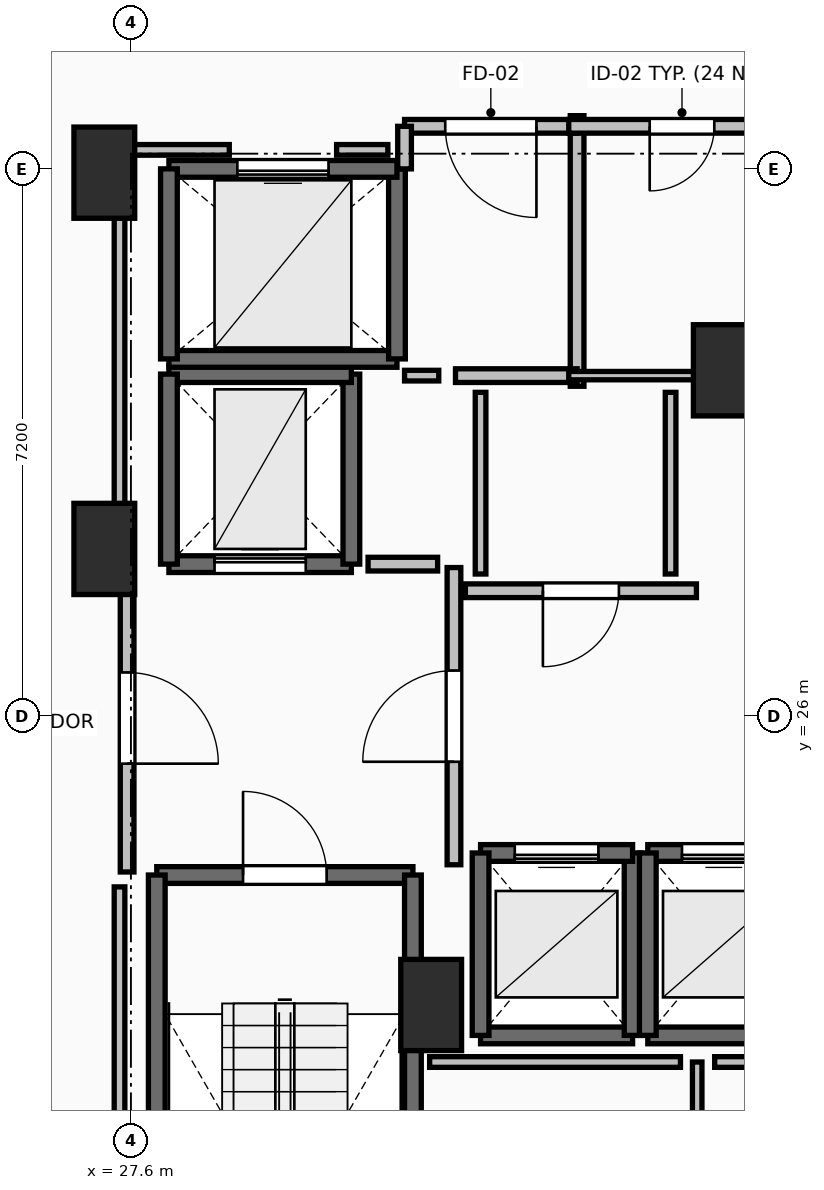
"""IFC4 building model, lengths in metres.
Left out: names, types, materials, properties, quantities, classifications, styles, units other than length and angle.
Written with IfcOpenShell. Run it as: python <this file> out.ifc"""

import sys

from ifc_helpers import new_model, si_unit, direction, frame, frame_2d, origin, origin_2d, place, context, subcontext, project, spatial, rectangle, extrude, element, fill, save


model = new_model("IFC4")
c1 = context("Model", 3, precision=1e-05, world=origin(), true_north=direction((0.0, 1.0)))
c2 = subcontext(c1, "Body", "Model", "MODEL_VIEW")
j1 = project(units=[si_unit("LENGTHUNIT", "METRE"), si_unit("PLANEANGLEUNIT", "RADIAN")], contexts=[c1])
p1 = place(None, origin())
s1 = spatial("IfcSite", under=j1, at=p1, CompositionType="ELEMENT")
p2 = place(p1, origin())
s2 = spatial("IfcBuilding", under=s1, at=p2, CompositionType="ELEMENT")
p3 = place(p2, frame((0.0, 0.0, 146.6)))
s3 = spatial("IfcBuildingStorey", under=s2, at=p3, CompositionType="ELEMENT", Elevation=146.6)
for number, where, z_axis, x_axis in (
    (1, (27.25, 28.2, 0.0), (0.0, 0.0, 1.0), (1.0, 0.0, 0.0)),
    (2, (27.25, 33.15, 0.0), (0.0, 0.0, 1.0), (1.0, 0.0, 0.0)),
    (3, (31.55, 22.2, 0.0), (0.0, 0.0, 1.0), (1.0, 0.0, 0.0)),
    (4, (35.4, 30.55, 0.0), (0.0, 0.0, 1.0), (1.0, 0.0, 0.0)),
):
    element("IfcColumn", number, at=place(p3, frame(where, z_axis=z_axis, x_axis=x_axis)), inside=s3, PredefinedType="PILASTER", context=c2, shape_type="SweptSolid", body=[
        extrude(rectangle(XDim=0.8, YDim=1.2, at=origin_2d()), origin(), (0.0, 0.0, 1.0), 3.5),
    ])
p4 = place(p3, frame((27.94, 23.91, 0.0), z_axis=(0.0, 0.0, 1.0), x_axis=(1.0, 0.0, 0.0)))
e5 = element("IfcWall", 5, at=p4, inside=s3, PredefinedType="SOLIDWALL", context=c2, shape_type="SweptSolid", body=[
    extrude(rectangle(XDim=3.37, YDim=0.22, at=frame_2d((1.685, 0.0))), origin(), (0.0, 0.0, 1.0), 3.24),
])
p5 = place(p4, frame((1.135, 0.0, 0.0)))
e6 = element("IfcOpeningElement", 6, at=p5, cuts=e5, PredefinedType="OPENING", context=c2, shape_type="SweptSolid", body=[
    extrude(rectangle(XDim=1.1, YDim=2.15, at=frame_2d((0.55, 1.075))), frame((0.0, 0.125, 0.0), z_axis=(0.0, -1.0, 0.0), x_axis=(1.0, 0.0, 0.0)), (0.0, 0.0, 1.0), 0.25),
])
for number, where, z_axis, x_axis in (
    (7, (31.31, 23.91, 0.0), (0.0, 0.0, 1.0), (0.0, -1.0, 0.0)),
    (8, (27.94, 16.49, 0.0), (0.0, 0.0, 1.0), (0.0, 1.0, 0.0)),
):
    element("IfcWall", number, at=place(p3, frame(where, z_axis=z_axis, x_axis=x_axis)), inside=s3, PredefinedType="SOLIDWALL", context=c2, shape_type="SweptSolid", body=[
        extrude(rectangle(XDim=7.42, YDim=0.22, at=frame_2d((3.71, 0.0))), origin(), (0.0, 0.0, 1.0), 3.24),
    ])
p6 = place(p3, frame((32.2, 21.8, 0.0), z_axis=(0.0, 0.0, 1.0), x_axis=(1.0, 0.0, 0.0)))
e9 = element("IfcWall", 9, at=p6, inside=s3, PredefinedType="SOLIDWALL", context=c2, shape_type="SweptSolid", body=[
    extrude(rectangle(XDim=2.0, YDim=0.22, at=frame_2d((1.0, 0.0))), origin(), (0.0, 0.0, 1.0), 3.24),
])
p7 = place(p3, frame((34.2, 21.8, 0.0), z_axis=(0.0, 0.0, 1.0), x_axis=(0.0, 1.0, 0.0)))
e10 = element("IfcWall", 10, at=p7, inside=s3, PredefinedType="SOLIDWALL", context=c2, shape_type="SweptSolid", body=[
    extrude(rectangle(XDim=2.4, YDim=0.22, at=frame_2d((1.2, 0.0))), origin(), (0.0, 0.0, 1.0), 3.24),
])
p8 = place(p3, frame((34.2, 24.2, 0.0), z_axis=(0.0, 0.0, 1.0), x_axis=(-1.0, 0.0, 0.0)))
e11 = element("IfcWall", 11, at=p8, inside=s3, PredefinedType="SOLIDWALL", context=c2, shape_type="SweptSolid", body=[
    extrude(rectangle(XDim=2.0, YDim=0.22, at=frame_2d((1.0, 0.0))), origin(), (0.0, 0.0, 1.0), 3.24),
])
p9 = place(p8, frame((0.45, 0.0, 0.0)))
e12 = element("IfcOpeningElement", 12, at=p9, cuts=e11, PredefinedType="OPENING", context=c2, shape_type="SweptSolid", body=[
    extrude(rectangle(XDim=1.1, YDim=2.2, at=frame_2d((0.55, 1.1))), frame((0.0, 0.125, 0.0), z_axis=(0.0, -1.0, 0.0), x_axis=(1.0, 0.0, 0.0)), (0.0, 0.0, 1.0), 0.25),
])
p10 = place(p3, frame((32.2, 24.2, 0.0), z_axis=(0.0, 0.0, 1.0), x_axis=(0.0, -1.0, 0.0)))
e13 = element("IfcWall", 13, at=p10, inside=s3, PredefinedType="SOLIDWALL", context=c2, shape_type="SweptSolid", body=[
    extrude(rectangle(XDim=2.4, YDim=0.22, at=frame_2d((1.2, 0.0))), origin(), (0.0, 0.0, 1.0), 3.24),
])
p11 = place(p3, frame((34.4, 21.8, 0.0), z_axis=(0.0, 0.0, 1.0), x_axis=(1.0, 0.0, 0.0)))
e14 = element("IfcWall", 14, at=p11, inside=s3, PredefinedType="SOLIDWALL", context=c2, shape_type="SweptSolid", body=[
    extrude(rectangle(XDim=2.0, YDim=0.22, at=frame_2d((1.0, 0.0))), origin(), (0.0, 0.0, 1.0), 3.24),
])
p12 = place(p3, frame((36.4, 24.2, 0.0), z_axis=(0.0, 0.0, 1.0), x_axis=(-1.0, 0.0, 0.0)))
e15 = element("IfcWall", 15, at=p12, inside=s3, PredefinedType="SOLIDWALL", context=c2, shape_type="SweptSolid", body=[
    extrude(rectangle(XDim=2.0, YDim=0.22, at=frame_2d((1.0, 0.0))), origin(), (0.0, 0.0, 1.0), 3.24),
])
p13 = place(p12, frame((0.45, 0.0, 0.0)))
e16 = element("IfcOpeningElement", 16, at=p13, cuts=e15, PredefinedType="OPENING", context=c2, shape_type="SweptSolid", body=[
    extrude(rectangle(XDim=1.1, YDim=2.2, at=frame_2d((0.55, 1.1))), frame((0.0, 0.125, 0.0), z_axis=(0.0, -1.0, 0.0), x_axis=(1.0, 0.0, 0.0)), (0.0, 0.0, 1.0), 0.25),
])
p14 = place(p3, frame((34.4, 24.2, 0.0), z_axis=(0.0, 0.0, 1.0), x_axis=(0.0, -1.0, 0.0)))
e17 = element("IfcWall", 17, at=p14, inside=s3, PredefinedType="SOLIDWALL", context=c2, shape_type="SweptSolid", body=[
    extrude(rectangle(XDim=2.4, YDim=0.22, at=frame_2d((1.2, 0.0))), origin(), (0.0, 0.0, 1.0), 3.24),
])
p15 = place(p3, frame((28.1, 28.0, 0.0), z_axis=(0.0, 0.0, 1.0), x_axis=(1.0, 0.0, 0.0)))
e18 = element("IfcWall", 18, at=p15, inside=s3, PredefinedType="SHEAR", context=c2, shape_type="SweptSolid", body=[
    extrude(rectangle(XDim=2.4, YDim=0.22, at=frame_2d((1.2, 0.0))), origin(), (0.0, 0.0, 1.0), 3.24),
])
p16 = place(p15, frame((0.6, 0.0, 0.0)))
e19 = element("IfcOpeningElement", 19, at=p16, cuts=e18, PredefinedType="OPENING", context=c2, shape_type="SweptSolid", body=[
    extrude(rectangle(XDim=1.2, YDim=2.2, at=frame_2d((0.6, 1.1))), frame((0.0, 0.125, 0.0), z_axis=(0.0, -1.0, 0.0), x_axis=(1.0, 0.0, 0.0)), (0.0, 0.0, 1.0), 0.25),
])
p17 = place(p3, frame((30.5, 28.0, 0.0), z_axis=(0.0, 0.0, 1.0), x_axis=(0.0, 1.0, 0.0)))
e20 = element("IfcWall", 20, at=p17, inside=s3, PredefinedType="SHEAR", context=c2, shape_type="SweptSolid", body=[
    extrude(rectangle(XDim=2.5, YDim=0.22, at=frame_2d((1.25, 0.0))), origin(), (0.0, 0.0, 1.0), 3.24),
])
p18 = place(p3, frame((30.5, 30.5, 0.0), z_axis=(0.0, 0.0, 1.0), x_axis=(-1.0, 0.0, 0.0)))
e21 = element("IfcWall", 21, at=p18, inside=s3, PredefinedType="SHEAR", context=c2, shape_type="SweptSolid", body=[
    extrude(rectangle(XDim=2.4, YDim=0.22, at=frame_2d((1.2, 0.0))), origin(), (0.0, 0.0, 1.0), 3.24),
])
p19 = place(p3, frame((28.1, 30.5, 0.0), z_axis=(0.0, 0.0, 1.0), x_axis=(0.0, -1.0, 0.0)))
e22 = element("IfcWall", 22, at=p19, inside=s3, PredefinedType="SHEAR", context=c2, shape_type="SweptSolid", body=[
    extrude(rectangle(XDim=2.5, YDim=0.22, at=frame_2d((1.25, 0.0))), origin(), (0.0, 0.0, 1.0), 3.24),
])
p20 = place(p3, frame((28.1, 30.7, 0.0), z_axis=(0.0, 0.0, 1.0), x_axis=(1.0, 0.0, 0.0)))
e23 = element("IfcWall", 23, at=p20, inside=s3, PredefinedType="SOLIDWALL", context=c2, shape_type="SweptSolid", body=[
    extrude(rectangle(XDim=3.0, YDim=0.22, at=frame_2d((1.5, 0.0))), origin(), (0.0, 0.0, 1.0), 3.24),
])
p21 = place(p3, frame((31.1, 30.7, 0.0), z_axis=(0.0, 0.0, 1.0), x_axis=(0.0, 1.0, 0.0)))
e24 = element("IfcWall", 24, at=p21, inside=s3, PredefinedType="SOLIDWALL", context=c2, shape_type="SweptSolid", body=[
    extrude(rectangle(XDim=2.5, YDim=0.22, at=frame_2d((1.25, 0.0))), origin(), (0.0, 0.0, 1.0), 3.24),
])
p22 = place(p3, frame((31.1, 33.2, 0.0), z_axis=(0.0, 0.0, 1.0), x_axis=(-1.0, 0.0, 0.0)))
e25 = element("IfcWall", 25, at=p22, inside=s3, PredefinedType="SOLIDWALL", context=c2, shape_type="SweptSolid", body=[
    extrude(rectangle(XDim=3.0, YDim=0.22, at=frame_2d((1.5, 0.0))), origin(), (0.0, 0.0, 1.0), 3.24),
])
p23 = place(p22, frame((0.9, 0.0, 0.0)))
e26 = element("IfcOpeningElement", 26, at=p23, cuts=e25, PredefinedType="OPENING", context=c2, shape_type="SweptSolid", body=[
    extrude(rectangle(XDim=1.2, YDim=2.2, at=frame_2d((0.6, 1.1))), frame((0.0, 0.125, 0.0), z_axis=(0.0, -1.0, 0.0), x_axis=(1.0, 0.0, 0.0)), (0.0, 0.0, 1.0), 0.25),
])
p24 = place(p3, frame((28.1, 33.2, 0.0), z_axis=(0.0, 0.0, 1.0), x_axis=(0.0, -1.0, 0.0)))
e27 = element("IfcWall", 27, at=p24, inside=s3, PredefinedType="SOLIDWALL", context=c2, shape_type="SweptSolid", body=[
    extrude(rectangle(XDim=2.5, YDim=0.22, at=frame_2d((1.25, 0.0))), origin(), (0.0, 0.0, 1.0), 3.24),
])
p25 = place(p3, frame((31.85, 24.045, 0.0), z_axis=(0.0, 0.0, 1.0), x_axis=(0.0, 1.0, 0.0)))
e28 = element("IfcWall", 28, at=p25, inside=s3, PredefinedType="PARTITIONING", context=c2, shape_type="SweptSolid", body=[
    extrude(rectangle(XDim=3.91, YDim=0.18, at=frame_2d((1.955, 0.0))), origin(), (0.0, 0.0, 1.0), 3.24),
])
p26 = place(p25, frame((1.355, 0.0, 0.0)))
e29 = element("IfcOpeningElement", 29, at=p26, cuts=e28, PredefinedType="OPENING", context=c2, shape_type="SweptSolid", body=[
    extrude(rectangle(XDim=1.2, YDim=2.15, at=frame_2d((0.6, 1.075))), frame((0.0, 0.105, 0.0), z_axis=(0.0, -1.0, 0.0), x_axis=(1.0, 0.0, 0.0)), (0.0, 0.0, 1.0), 0.21),
])
p27 = place(p3, frame((27.55, 28.0, 0.0), z_axis=(0.0, 0.0, 1.0), x_axis=(0.0, -1.0, 0.0)))
e30 = element("IfcWall", 30, at=p27, inside=s3, PredefinedType="PARTITIONING", context=c2, shape_type="SweptSolid", body=[
    extrude(rectangle(XDim=4.05, YDim=0.18, at=frame_2d((2.025, 0.0))), origin(), (0.0, 0.0, 1.0), 3.24),
])
p28 = place(p27, frame((1.425, 0.0, 0.0)))
e31 = element("IfcOpeningElement", 31, at=p28, cuts=e30, PredefinedType="OPENING", context=c2, shape_type="SweptSolid", body=[
    extrude(rectangle(XDim=1.2, YDim=2.15, at=frame_2d((0.6, 1.075))), frame((0.0, 0.105, 0.0), z_axis=(0.0, -1.0, 0.0), x_axis=(1.0, 0.0, 0.0)), (0.0, 0.0, 1.0), 0.21),
])
p29 = place(p3, frame((33.47, 30.34, 0.0), z_axis=(0.0, 0.0, 1.0), x_axis=(0.0, 1.0, 0.0)))
e32 = element("IfcWall", 32, at=p29, inside=s3, PredefinedType="PARTITIONING", context=c2, shape_type="SweptSolid", body=[
    extrude(rectangle(XDim=3.56, YDim=0.18, at=frame_2d((1.78, 0.0))), origin(), (0.0, 0.0, 1.0), 3.24),
])
p30 = place(p3, frame((31.87, 30.48, 0.0), z_axis=(0.0, 0.0, 1.0), x_axis=(1.0, 0.0, 0.0)))
e33 = element("IfcWall", 33, at=p30, inside=s3, PredefinedType="PARTITIONING", context=c2, shape_type="SweptSolid", body=[
    extrude(rectangle(XDim=1.6, YDim=0.18, at=frame_2d((0.8, 0.0))), origin(), (0.0, 0.0, 1.0), 3.24),
])
p31 = place(p3, frame((33.47, 33.76, 0.0), z_axis=(0.0, 0.0, 1.0), x_axis=(-1.0, 0.0, 0.0)))
e34 = element("IfcWall", 34, at=p31, inside=s3, PredefinedType="PARTITIONING", context=c2, shape_type="SweptSolid", body=[
    extrude(rectangle(XDim=2.27, YDim=0.18, at=frame_2d((1.135, 0.0))), origin(), (0.0, 0.0, 1.0), 3.24),
])
p32 = place(p31, frame((0.535, 0.0, 0.0)))
e35 = element("IfcOpeningElement", 35, at=p32, cuts=e34, PredefinedType="OPENING", context=c2, shape_type="SweptSolid", body=[
    extrude(rectangle(XDim=1.2, YDim=2.15, at=frame_2d((0.6, 1.075))), frame((0.0, 0.105, 0.0), z_axis=(0.0, -1.0, 0.0), x_axis=(1.0, 0.0, 0.0)), (0.0, 0.0, 1.0), 0.21),
])
p33 = place(p3, frame((31.2, 33.76, 0.0), z_axis=(0.0, 0.0, 1.0), x_axis=(0.0, -1.0, 0.0)))
e36 = element("IfcWall", 36, at=p33, inside=s3, PredefinedType="PARTITIONING", context=c2, shape_type="SweptSolid", body=[
    extrude(rectangle(XDim=0.56, YDim=0.18, at=frame_2d((0.28, 0.0))), origin(), (0.0, 0.0, 1.0), 3.24),
])
p34 = place(p3, frame((35.04, 27.65, 0.0), z_axis=(0.0, 0.0, 1.0), x_axis=(-1.0, 0.0, 0.0)))
e37 = element("IfcWall", 37, at=p34, inside=s3, PredefinedType="PARTITIONING", context=c2, shape_type="SweptSolid", body=[
    extrude(rectangle(XDim=3.04, YDim=0.18, at=frame_2d((1.52, 0.0))), origin(), (0.0, 0.0, 1.0), 3.24),
])
p35 = place(p34, frame((1.02, 0.0, 0.0)))
e38 = element("IfcOpeningElement", 38, at=p35, cuts=e37, PredefinedType="OPENING", context=c2, shape_type="SweptSolid", body=[
    extrude(rectangle(XDim=1.0, YDim=2.15, at=frame_2d((0.5, 1.075))), frame((0.0, 0.105, 0.0), z_axis=(0.0, -1.0, 0.0), x_axis=(1.0, 0.0, 0.0)), (0.0, 0.0, 1.0), 0.21),
])
p36 = place(p3, frame((33.36, 30.48, 0.0), z_axis=(0.0, 0.0, 1.0), x_axis=(1.0, 0.0, 0.0)))
e39 = element("IfcWall", 39, at=p36, inside=s3, PredefinedType="PARTITIONING", context=c2, shape_type="SweptSolid", body=[
    extrude(rectangle(XDim=1.81, YDim=0.11, at=frame_2d((0.905, 0.0))), origin(), (0.0, 0.0, 1.0), 3.24),
])
p37 = place(p3, frame((36.34, 33.76, 0.0), z_axis=(0.0, 0.0, 1.0), x_axis=(-1.0, 0.0, 0.0)))
e40 = element("IfcWall", 40, at=p37, inside=s3, PredefinedType="PARTITIONING", context=c2, shape_type="SweptSolid", body=[
    extrude(rectangle(XDim=2.98, YDim=0.18, at=frame_2d((1.49, 0.0))), origin(), (0.0, 0.0, 1.0), 3.24),
])
p38 = place(p37, frame((1.065, 0.0, 0.0)))
e41 = element("IfcOpeningElement", 41, at=p38, cuts=e40, PredefinedType="OPENING", context=c2, shape_type="SweptSolid", body=[
    extrude(rectangle(XDim=0.85, YDim=2.1, at=frame_2d((0.425, 1.05))), frame((0.0, 0.105, 0.0), z_axis=(0.0, -1.0, 0.0), x_axis=(1.0, 0.0, 0.0)), (0.0, 0.0, 1.0), 0.21),
])
p39 = place(p3, frame((35.05, 16.32, 0.0), z_axis=(0.0, 0.0, 1.0), x_axis=(0.0, 1.0, 0.0)))
e42 = element("IfcWall", 42, at=p39, inside=s3, PredefinedType="PARTITIONING", context=c2, shape_type="SweptSolid", body=[
    extrude(rectangle(XDim=5.13, YDim=0.125, at=frame_2d((2.565, 0.0))), origin(), (0.0, 0.0, 1.0), 3.24),
])
p40 = place(p3, frame((31.635, 28.0, 0.0), z_axis=(0.0, 0.0, 1.0), x_axis=(-1.0, 0.0, 0.0)))
e43 = element("IfcWall", 43, at=p40, inside=s3, PredefinedType="PARTITIONING", context=c2, shape_type="SweptSolid", body=[
    extrude(rectangle(XDim=0.915, YDim=0.18, at=frame_2d((0.458, 0.0))), origin(), (0.0, 0.0, 1.0), 3.24),
])
p41 = place(p3, frame((31.2, 30.48, 0.0), z_axis=(0.0, 0.0, 1.0), x_axis=(1.0, 0.0, 0.0)))
e44 = element("IfcWall", 44, at=p41, inside=s3, PredefinedType="PARTITIONING", context=c2, shape_type="SweptSolid", body=[
    extrude(rectangle(XDim=0.45, YDim=0.14, at=frame_2d((0.225, 0.0))), origin(), (0.0, 0.0, 1.0), 3.24),
])
p42 = place(p3, frame((35.14, 30.48, 0.0), z_axis=(0.0, 0.0, 1.0), x_axis=(1.0, 0.0, 0.0)))
e45 = element("IfcWall", 45, at=p42, inside=s3, PredefinedType="PARTITIONING", context=c2, shape_type="SweptSolid", body=[
    extrude(rectangle(XDim=1.0, YDim=0.14, at=frame_2d((0.5, 0.0))), origin(), (0.0, 0.0, 1.0), 2.432),
])
p43 = place(p3, frame((34.83, 21.45, 0.0), z_axis=(0.0, 0.0, 1.0), x_axis=(-1.0, 0.0, 0.0)))
e46 = element("IfcWall", 46, at=p43, inside=s3, PredefinedType="PARTITIONING", context=c2, shape_type="SweptSolid", body=[
    extrude(rectangle(XDim=3.3, YDim=0.14, at=frame_2d((1.65, 0.0))), origin(), (0.0, 0.0, 1.0), 3.24),
])
p44 = place(p3, frame((36.439, 21.45, 0.0), z_axis=(0.0, 0.0, 1.0), x_axis=(-1.0, 0.0, 0.0)))
e47 = element("IfcWall", 47, at=p44, inside=s3, PredefinedType="PARTITIONING", context=c2, shape_type="SweptSolid", body=[
    extrude(rectangle(XDim=1.159, YDim=0.14, at=frame_2d((0.58, 0.0))), origin(), (0.0, 0.0, 1.0), 3.24),
])
for number, where, z_axis, x_axis in (
    (48, (32.2, 30.26, 0.0), (0.0, 0.0, 1.0), (0.0, -1.0, 0.0)),
    (49, (34.7, 27.87, 0.0), (0.0, 0.0, 1.0), (0.0, 1.0, 0.0)),
):
    element("IfcWall", number, at=place(p3, frame(where, z_axis=z_axis, x_axis=x_axis)), inside=s3, PredefinedType="PARTITIONING", context=c2, shape_type="SweptSolid", body=[
        extrude(rectangle(XDim=2.39, YDim=0.14, at=frame_2d((1.195, 0.0))), origin(), (0.0, 0.0, 1.0), 3.24),
    ])
p45 = place(p3, frame((30.98, 33.45, 0.0), z_axis=(0.0, 0.0, 1.0), x_axis=(-1.0, 0.0, 0.0)))
e50 = element("IfcWall", 50, at=p45, inside=s3, PredefinedType="PARTITIONING", context=c2, shape_type="SweptSolid", body=[
    extrude(rectangle(XDim=0.674, YDim=0.14, at=frame_2d((0.337, 0.0))), origin(), (0.0, 0.0, 1.0), 3.24),
])
p46 = place(p3, frame((28.894, 33.45, 0.0), z_axis=(0.0, 0.0, 1.0), x_axis=(-1.0, 0.0, 0.0)))
e51 = element("IfcWall", 51, at=p46, inside=s3, PredefinedType="PARTITIONING", context=c2, shape_type="SweptSolid", body=[
    extrude(rectangle(XDim=1.444, YDim=0.14, at=frame_2d((0.722, 0.0))), origin(), (0.0, 0.0, 1.0), 2.432),
])
p47 = place(p3, frame((27.45, 33.45, 0.0), z_axis=(0.0, 0.0, 1.0), x_axis=(0.0, -1.0, 0.0)))
e52 = element("IfcWall", 52, at=p47, inside=s3, PredefinedType="PARTITIONING", context=c2, shape_type="SweptSolid", body=[
    extrude(rectangle(XDim=5.254, YDim=0.14, at=frame_2d((2.627, 0.0))), origin(), (0.0, 0.0, 1.0), 2.432),
])
p48 = place(p3, frame((27.45, 23.754, 0.0), z_axis=(0.0, 0.0, 1.0), x_axis=(0.0, -1.0, 0.0)))
e53 = element("IfcWall", 53, at=p48, inside=s3, PredefinedType="PARTITIONING", context=c2, shape_type="SweptSolid", body=[
    extrude(rectangle(XDim=7.514, YDim=0.14, at=frame_2d((3.757, 0.0))), origin(), (0.0, 0.0, 1.0), 2.432),
])
p49 = place(p5, origin())
e54 = element("IfcDoor", 54, at=p49, inside=s3, OperationType="SINGLE_SWING_LEFT", PredefinedType="DOOR", context=c2, shape_type="SweptSolid", body=[
    extrude(rectangle(XDim=1.1, YDim=2.15, at=frame_2d((0.55, 1.075))), frame((0.0, 0.025, 0.0), z_axis=(0.0, -1.0, 0.0), x_axis=(1.0, 0.0, 0.0)), (0.0, 0.0, 1.0), 0.05),
])
fill(e6, e54)
p50 = place(p9, origin())
e55 = element("IfcDoor", 55, at=p50, inside=s3, OperationType="SLIDING_TO_LEFT", PredefinedType="DOOR", context=c2, shape_type="SweptSolid", body=[
    extrude(rectangle(XDim=1.1, YDim=2.2, at=frame_2d((0.55, 1.1))), frame((0.0, 0.025, 0.0), z_axis=(0.0, -1.0, 0.0), x_axis=(1.0, 0.0, 0.0)), (0.0, 0.0, 1.0), 0.05),
])
fill(e12, e55)
p51 = place(p13, origin())
e56 = element("IfcDoor", 56, at=p51, inside=s3, OperationType="SLIDING_TO_LEFT", PredefinedType="DOOR", context=c2, shape_type="SweptSolid", body=[
    extrude(rectangle(XDim=1.1, YDim=2.2, at=frame_2d((0.55, 1.1))), frame((0.0, 0.025, 0.0), z_axis=(0.0, -1.0, 0.0), x_axis=(1.0, 0.0, 0.0)), (0.0, 0.0, 1.0), 0.05),
])
fill(e16, e56)
p52 = place(p16, origin())
e57 = element("IfcDoor", 57, at=p52, inside=s3, OperationType="SLIDING_TO_LEFT", PredefinedType="DOOR", context=c2, shape_type="SweptSolid", body=[
    extrude(rectangle(XDim=1.2, YDim=2.2, at=frame_2d((0.6, 1.1))), frame((0.0, 0.025, 0.0), z_axis=(0.0, -1.0, 0.0), x_axis=(1.0, 0.0, 0.0)), (0.0, 0.0, 1.0), 0.05),
])
fill(e19, e57)
p53 = place(p23, origin())
e58 = element("IfcDoor", 58, at=p53, inside=s3, OperationType="SLIDING_TO_LEFT", PredefinedType="DOOR", context=c2, shape_type="SweptSolid", body=[
    extrude(rectangle(XDim=1.2, YDim=2.2, at=frame_2d((0.6, 1.1))), frame((0.0, 0.025, 0.0), z_axis=(0.0, -1.0, 0.0), x_axis=(1.0, 0.0, 0.0)), (0.0, 0.0, 1.0), 0.05),
])
fill(e26, e58)
p54 = place(p26, origin())
e59 = element("IfcDoor", 59, at=p54, inside=s3, OperationType="SINGLE_SWING_LEFT", PredefinedType="DOOR", context=c2, shape_type="SweptSolid", body=[
    extrude(rectangle(XDim=1.2, YDim=2.15, at=frame_2d((0.6, 1.075))), frame((0.0, 0.025, 0.0), z_axis=(0.0, -1.0, 0.0), x_axis=(1.0, 0.0, 0.0)), (0.0, 0.0, 1.0), 0.05),
])
fill(e29, e59)
p55 = place(p28, origin())
e60 = element("IfcDoor", 60, at=p55, inside=s3, OperationType="SINGLE_SWING_RIGHT", PredefinedType="DOOR", context=c2, shape_type="SweptSolid", body=[
    extrude(rectangle(XDim=1.2, YDim=2.15, at=frame_2d((0.6, 1.075))), frame((0.0, 0.025, 0.0), z_axis=(0.0, -1.0, 0.0), x_axis=(1.0, 0.0, 0.0)), (0.0, 0.0, 1.0), 0.05),
])
fill(e31, e60)
p56 = place(p32, origin())
e61 = element("IfcDoor", 61, at=p56, inside=s3, OperationType="SINGLE_SWING_LEFT", PredefinedType="DOOR", context=c2, shape_type="SweptSolid", body=[
    extrude(rectangle(XDim=1.2, YDim=2.15, at=frame_2d((0.6, 1.075))), frame((0.0, 0.025, 0.0), z_axis=(0.0, -1.0, 0.0), x_axis=(1.0, 0.0, 0.0)), (0.0, 0.0, 1.0), 0.05),
])
fill(e35, e61)
p57 = place(p35, origin())
e62 = element("IfcDoor", 62, at=p57, inside=s3, OperationType="SINGLE_SWING_RIGHT", PredefinedType="DOOR", context=c2, shape_type="SweptSolid", body=[
    extrude(rectangle(XDim=1.0, YDim=2.15, at=frame_2d((0.5, 1.075))), frame((0.0, 0.025, 0.0), z_axis=(0.0, -1.0, 0.0), x_axis=(1.0, 0.0, 0.0)), (0.0, 0.0, 1.0), 0.05),
])
fill(e38, e62)
p58 = place(p38, origin())
e63 = element("IfcDoor", 63, at=p58, inside=s3, OperationType="SINGLE_SWING_RIGHT", PredefinedType="DOOR", context=c2, shape_type="SweptSolid", body=[
    extrude(rectangle(XDim=0.85, YDim=2.1, at=frame_2d((0.425, 1.05))), frame((0.0, 0.025, 0.0), z_axis=(0.0, -1.0, 0.0), x_axis=(1.0, 0.0, 0.0)), (0.0, 0.0, 1.0), 0.05),
])
fill(e41, e63)
save(model, sys.argv[1])
